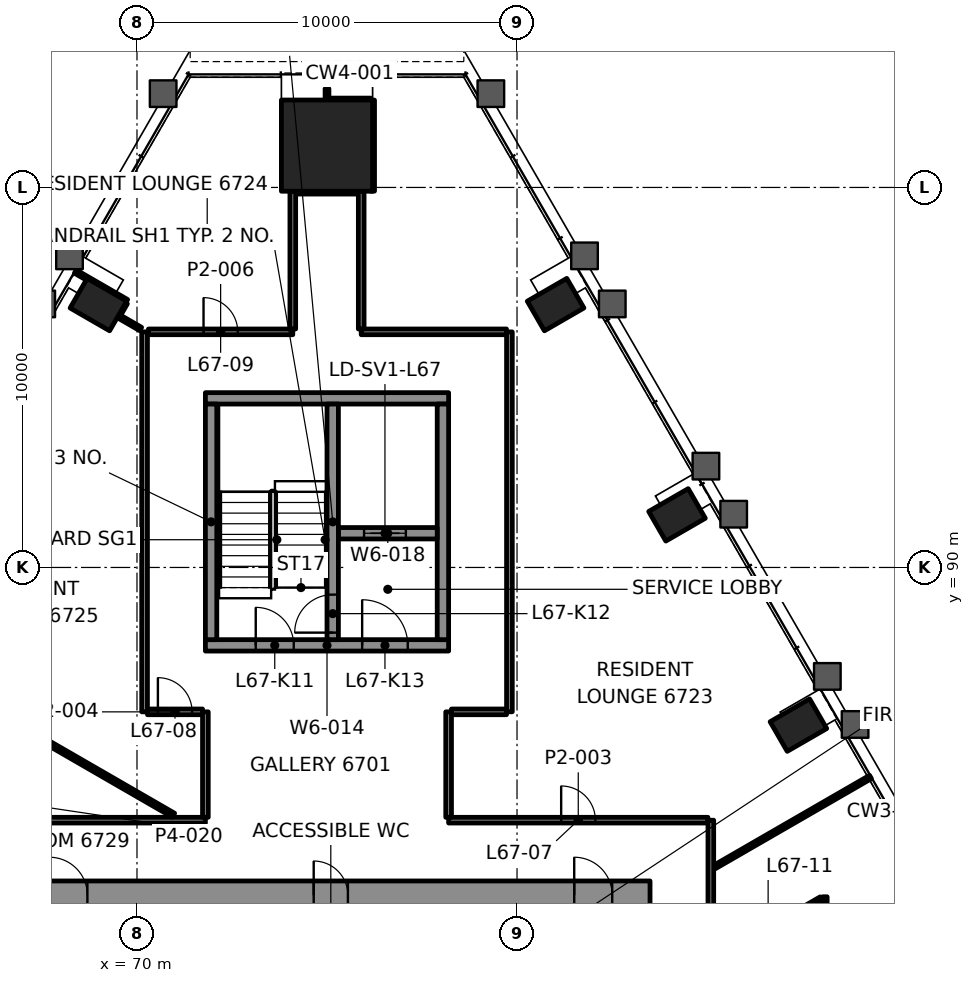
"""IFC4 building model, lengths in metres.
Left out: names, types, materials, properties, quantities, classifications, styles, units other than length and angle.
Written with IfcOpenShell. Run it as: python <this file> out.ifc"""

import sys

from ifc_helpers import new_model, si_unit, direction, frame, frame_2d, origin, origin_2d, place, context, subcontext, project, spatial, rectangle, hollow_rectangle, extrude, element, fill, save


model = new_model("IFC4")
c1 = context("Model", 3, precision=1e-05, world=origin(), true_north=direction((0.0, 1.0)))
c2 = subcontext(c1, "Body", "Model", "MODEL_VIEW")
j1 = project(units=[si_unit("LENGTHUNIT", "METRE"), si_unit("PLANEANGLEUNIT", "RADIAN")], contexts=[c1])
p1 = place(None, origin())
s1 = spatial("IfcSite", under=j1, at=p1, CompositionType="ELEMENT")
p2 = place(p1, origin())
s2 = spatial("IfcBuilding", under=s1, at=p2, CompositionType="ELEMENT")
p3 = place(p2, frame((0.0, 0.0, 281.1)))
s3 = spatial("IfcBuildingStorey", under=s2, at=p3, CompositionType="ELEMENT", Elevation=281.1)
p4 = place(p3, frame((75.0, 101.101, 0.0), z_axis=(0.0, 0.0, 1.0), x_axis=(-1.0, 0.0, 0.0)))
e1 = element("IfcColumn", 1, at=p4, inside=s3, PredefinedType="COLUMN", context=c2, shape_type="SweptSolid", body=[
    extrude(rectangle(XDim=2.4, YDim=2.4, at=origin_2d()), origin(), (0.0, 0.0, 1.0), 3.5),
])
for number, where, z_axis, x_axis in (
    (2, (87.405, 85.851, -0.0), (0.0, 0.0, 1.0), (-0.5, 0.866, 0.0)),
    (3, (84.21, 91.384, -0.0), (0.0, 0.0, 1.0), (-0.5, 0.866, 0.0)),
    (4, (81.015, 96.917, -0.0), (0.0, 0.0, 1.0), (-0.5, 0.866, 0.0)),
    (5, (68.985, 96.917, -0.0), (0.0, 0.0, 1.0), (-0.5, -0.866, 0.0)),
):
    element("IfcColumn", number, at=place(p3, frame(where, z_axis=z_axis, x_axis=x_axis)), inside=s3, PredefinedType="COLUMN", context=c2, shape_type="SweptSolid", body=[
        extrude(hollow_rectangle(XDim=0.9, YDim=1.2, WallThickness=0.06, at=origin_2d()), origin(), (0.0, 0.0, 1.0), 3.5),
    ])
p5 = place(p3, frame((66.5, 81.375, 0.0), z_axis=(0.0, 0.0, 1.0), x_axis=(1.0, 0.0, 0.0)))
e6 = element("IfcWall", 6, at=p5, inside=s3, PredefinedType="SHEAR", context=c2, shape_type="SweptSolid", body=[
    extrude(rectangle(XDim=17.0, YDim=0.75, at=frame_2d((8.5, 0.0))), origin(), (0.0, 0.0, 1.0), 3.3),
])
p6 = place(p5, frame((1.195, 0.0, 0.0)))
e7 = element("IfcOpeningElement", 7, at=p6, cuts=e6, PredefinedType="OPENING", context=c2, shape_type="SweptSolid", body=[
    extrude(rectangle(XDim=1.0, YDim=2.1, at=frame_2d((0.5, 1.05))), frame((0.0, 0.385, 0.0), z_axis=(0.0, -1.0, 0.0), x_axis=(1.0, 0.0, 0.0)), (0.0, 0.0, 1.0), 0.77),
])
p7 = place(p5, frame((15.005, 0.0, 0.0)))
e8 = element("IfcOpeningElement", 8, at=p7, cuts=e6, PredefinedType="OPENING", context=c2, shape_type="SweptSolid", body=[
    extrude(rectangle(XDim=1.0, YDim=2.1, at=frame_2d((0.5, 1.05))), frame((0.0, 0.385, 0.0), z_axis=(0.0, -1.0, 0.0), x_axis=(1.0, 0.0, 0.0)), (0.0, 0.0, 1.0), 0.77),
])
p8 = place(p5, frame((8.15, 0.0, 0.0)))
e9 = element("IfcOpeningElement", 9, at=p8, cuts=e6, PredefinedType="OPENING", context=c2, shape_type="SweptSolid", body=[
    extrude(rectangle(XDim=0.9, YDim=2.1, at=frame_2d((0.45, 1.05))), frame((0.0, 0.385, 0.0), z_axis=(0.0, -1.0, 0.0), x_axis=(1.0, 0.0, 0.0)), (0.0, 0.0, 1.0), 0.77),
])
p9 = place(p3, frame((71.8, 87.95, 0.0), z_axis=(0.0, 0.0, 1.0), x_axis=(1.0, 0.0, 0.0)))
e10 = element("IfcWall", 10, at=p9, inside=s3, PredefinedType="SHEAR", context=c2, shape_type="SweptSolid", body=[
    extrude(rectangle(XDim=6.4, YDim=0.3, at=frame_2d((3.2, 0.0))), origin(), (0.0, 0.0, 1.0), 3.3),
])
p10 = place(p9, frame((1.325, 0.0, 0.0)))
e11 = element("IfcOpeningElement", 11, at=p10, cuts=e10, PredefinedType="OPENING", context=c2, shape_type="SweptSolid", body=[
    extrude(rectangle(XDim=1.0, YDim=2.1, at=frame_2d((0.5, 1.05))), frame((0.0, 0.16, 0.0), z_axis=(0.0, -1.0, 0.0), x_axis=(1.0, 0.0, 0.0)), (0.0, 0.0, 1.0), 0.32),
])
p11 = place(p9, frame((4.125, 0.0, 0.0)))
e12 = element("IfcOpeningElement", 12, at=p11, cuts=e10, PredefinedType="OPENING", context=c2, shape_type="SweptSolid", body=[
    extrude(rectangle(XDim=1.2, YDim=2.1, at=frame_2d((0.6, 1.05))), frame((0.0, 0.16, 0.0), z_axis=(0.0, -1.0, 0.0), x_axis=(1.0, 0.0, 0.0)), (0.0, 0.0, 1.0), 0.32),
])
p12 = place(p3, frame((71.8, 94.45, 0.0), z_axis=(0.0, 0.0, 1.0), x_axis=(1.0, 0.0, 0.0)))
e13 = element("IfcWall", 13, at=p12, inside=s3, PredefinedType="SHEAR", context=c2, shape_type="SweptSolid", body=[
    extrude(rectangle(XDim=6.4, YDim=0.3, at=frame_2d((3.2, 0.0))), origin(), (0.0, 0.0, 1.0), 3.3),
])
for number, where, z_axis, x_axis in (
    (14, (71.95, 88.1, 0.0), (0.0, 0.0, 1.0), (0.0, 1.0, 0.0)),
    (15, (78.05, 88.1, 0.0), (0.0, 0.0, 1.0), (0.0, 1.0, 0.0)),
):
    element("IfcWall", number, at=place(p3, frame(where, z_axis=z_axis, x_axis=x_axis)), inside=s3, PredefinedType="SHEAR", context=c2, shape_type="SweptSolid", body=[
        extrude(rectangle(XDim=6.2, YDim=0.3, at=frame_2d((3.1, 0.0))), origin(), (0.0, 0.0, 1.0), 3.3),
    ])
p13 = place(p3, frame((75.3, 90.9, 0.0), z_axis=(0.0, 0.0, 1.0), x_axis=(1.0, 0.0, 0.0)))
e16 = element("IfcWall", 16, at=p13, inside=s3, PredefinedType="SHEAR", context=c2, shape_type="SweptSolid", body=[
    extrude(rectangle(XDim=2.6, YDim=0.3, at=frame_2d((1.3, 0.0))), origin(), (0.0, 0.0, 1.0), 3.3),
])
p14 = place(p13, frame((0.675, 0.0, 0.0)))
e17 = element("IfcOpeningElement", 17, at=p14, cuts=e16, PredefinedType="OPENING", context=c2, shape_type="SweptSolid", body=[
    extrude(rectangle(XDim=1.1, YDim=2.1, at=frame_2d((0.55, 1.05))), frame((0.0, 0.16, 0.0), z_axis=(0.0, -1.0, 0.0), x_axis=(1.0, 0.0, 0.0)), (0.0, 0.0, 1.0), 0.32),
])
p15 = place(p3, frame((75.15, 88.1, 0.0), z_axis=(0.0, 0.0, 1.0), x_axis=(0.0, 1.0, 0.0)))
e18 = element("IfcWall", 18, at=p15, inside=s3, PredefinedType="SHEAR", context=c2, shape_type="SweptSolid", body=[
    extrude(rectangle(XDim=6.2, YDim=0.3, at=frame_2d((3.1, 0.0))), origin(), (0.0, 0.0, 1.0), 3.3),
])
p16 = place(p15, frame((0.185, 0.0, 0.0)))
e19 = element("IfcOpeningElement", 19, at=p16, cuts=e18, PredefinedType="OPENING", context=c2, shape_type="SweptSolid", body=[
    extrude(rectangle(XDim=1.0, YDim=2.1, at=frame_2d((0.5, 1.05))), frame((0.0, 0.16, 0.0), z_axis=(0.0, -1.0, 0.0), x_axis=(1.0, 0.0, 0.0)), (0.0, 0.0, 1.0), 0.32),
])
p17 = place(p3, frame((64.975, 83.35, 0.0), z_axis=(0.0, 0.0, 1.0), x_axis=(1.0, 0.0, 0.0)))
e20 = element("IfcWall", 20, at=p17, inside=s3, PredefinedType="PARTITIONING", context=c2, shape_type="SweptSolid", body=[
    extrude(rectangle(XDim=6.825, YDim=0.15, at=frame_2d((3.413, 0.0))), origin(), (0.0, 0.0, 1.0), 2.7),
])
p18 = place(p3, frame((78.2, 83.35, 0.0), z_axis=(0.0, 0.0, 1.0), x_axis=(1.0, 0.0, 0.0)))
e21 = element("IfcWall", 21, at=p18, inside=s3, PredefinedType="PARTITIONING", context=c2, shape_type="SweptSolid", body=[
    extrude(rectangle(XDim=6.823, YDim=0.15, at=frame_2d((3.412, 0.0))), origin(), (0.0, 0.0, 1.0), 2.7),
])
p19 = place(p18, frame((2.961, 0.0, 0.0)))
e22 = element("IfcOpeningElement", 22, at=p19, cuts=e21, PredefinedType="OPENING", context=c2, shape_type="SweptSolid", body=[
    extrude(rectangle(XDim=0.9, YDim=2.1, at=frame_2d((0.45, 1.05))), frame((0.0, 0.085, 0.0), z_axis=(0.0, -1.0, 0.0), x_axis=(1.0, 0.0, 0.0)), (0.0, 0.0, 1.0), 0.17),
])
p20 = place(p3, frame((70.276, 86.2, 0.0), z_axis=(0.0, 0.0, 1.0), x_axis=(1.0, 0.0, 0.0)))
e23 = element("IfcWall", 23, at=p20, inside=s3, PredefinedType="PARTITIONING", context=c2, shape_type="SweptSolid", body=[
    extrude(rectangle(XDim=1.449, YDim=0.15, at=frame_2d((0.725, 0.0))), origin(), (0.0, 0.0, 1.0), 2.7),
])
p21 = place(p20, frame((0.275, 0.0, 0.0)))
e24 = element("IfcOpeningElement", 24, at=p21, cuts=e23, PredefinedType="OPENING", context=c2, shape_type="SweptSolid", body=[
    extrude(rectangle(XDim=0.9, YDim=2.1, at=frame_2d((0.45, 1.05))), frame((0.0, 0.085, 0.0), z_axis=(0.0, -1.0, 0.0), x_axis=(1.0, 0.0, 0.0)), (0.0, 0.0, 1.0), 0.17),
])
p22 = place(p3, frame((78.275, 86.2, 0.0), z_axis=(0.0, 0.0, 1.0), x_axis=(1.0, 0.0, 0.0)))
e25 = element("IfcWall", 25, at=p22, inside=s3, PredefinedType="PARTITIONING", context=c2, shape_type="SweptSolid", body=[
    extrude(rectangle(XDim=1.448, YDim=0.15, at=frame_2d((0.724, 0.0))), origin(), (0.0, 0.0, 1.0), 2.7),
])
p23 = place(p3, frame((70.302, 96.2, 0.0), z_axis=(0.0, 0.0, 1.0), x_axis=(1.0, 0.0, 0.0)))
e26 = element("IfcWall", 26, at=p23, inside=s3, PredefinedType="PARTITIONING", context=c2, shape_type="SweptSolid", body=[
    extrude(rectangle(XDim=3.798, YDim=0.15, at=frame_2d((1.899, 0.0))), origin(), (0.0, 0.0, 1.0), 2.7),
])
p24 = place(p23, frame((1.449, 0.0, 0.0)))
e27 = element("IfcOpeningElement", 27, at=p24, cuts=e26, PredefinedType="OPENING", context=c2, shape_type="SweptSolid", body=[
    extrude(rectangle(XDim=0.9, YDim=2.1, at=frame_2d((0.45, 1.05))), frame((0.0, 0.085, 0.0), z_axis=(0.0, -1.0, 0.0), x_axis=(1.0, 0.0, 0.0)), (0.0, 0.0, 1.0), 0.17),
])
p25 = place(p3, frame((75.9, 96.2, 0.0), z_axis=(0.0, 0.0, 1.0), x_axis=(1.0, 0.0, 0.0)))
e28 = element("IfcWall", 28, at=p25, inside=s3, PredefinedType="PARTITIONING", context=c2, shape_type="SweptSolid", body=[
    extrude(rectangle(XDim=3.823, YDim=0.15, at=frame_2d((1.911, 0.0))), origin(), (0.0, 0.0, 1.0), 2.7),
])
p26 = place(p3, frame((74.176, 99.901, 0.0), z_axis=(0.0, 0.0, 1.0), x_axis=(1.0, 0.0, 0.0)))
e29 = element("IfcWall", 29, at=p26, inside=s3, PredefinedType="PARTITIONING", context=c2, shape_type="SweptSolid", body=[
    extrude(rectangle(XDim=1.642, YDim=0.15, at=frame_2d((0.821, 0.0))), origin(), (0.0, 0.0, 1.0), 2.697),
])
p27 = place(p3, frame((75.0, 102.301, 0.0), z_axis=(0.0, 0.0, 1.0), x_axis=(1.0, 0.0, 0.0)))
e30 = element("IfcWall", 30, at=p27, inside=s3, PredefinedType="PARTITIONING", context=c2, shape_type="SweptSolid", body=[
    extrude(rectangle(XDim=1.147, YDim=0.1, at=frame_2d((0.574, 0.0))), origin(), (0.0, 0.0, 1.0), 2.7),
])
p28 = place(p3, frame((88.005, 81.279, 0.0), z_axis=(0.0, 0.0, 1.0), x_axis=(-0.866000447062, -0.500043223821, 0.0)))
e31 = element("IfcWall", 31, at=p28, inside=s3, PredefinedType="PARTITIONING", context=c2, shape_type="SweptSolid", body=[
    extrude(rectangle(XDim=3.228, YDim=0.12, at=frame_2d((1.614, 0.0))), origin(), (0.0, 0.0, 1.0), 2.7),
])
p29 = place(p28, frame((1.214, 0.0, 0.0)))
e32 = element("IfcOpeningElement", 32, at=p29, cuts=e31, PredefinedType="OPENING", context=c2, shape_type="SweptSolid", body=[
    extrude(rectangle(XDim=0.8, YDim=2.1, at=frame_2d((0.4, 1.05))), frame((0.0, 0.07, 0.0), z_axis=(0.0, -1.0, 0.0), x_axis=(1.0, 0.0, 0.0)), (0.0, 0.0, 1.0), 0.14),
])
p30 = place(p3, frame((85.201, 82.119, 0.0), z_axis=(0.0, 0.0, 1.0), x_axis=(0.866035297817, 0.499982862641, 0.0)))
e33 = element("IfcWall", 33, at=p30, inside=s3, PredefinedType="PARTITIONING", context=c2, shape_type="SweptSolid", body=[
    extrude(rectangle(XDim=4.734, YDim=0.1, at=frame_2d((2.367, 0.0))), origin(), (0.0, 0.0, 1.0), 2.688),
])
p31 = place(p3, frame((69.53, 96.661, 0.0), z_axis=(0.0, 0.0, 1.0), x_axis=(0.499904278411, 0.866080661617, 0.0)))
e34 = element("IfcWall", 34, at=p31, inside=s3, PredefinedType="PARTITIONING", context=c2, shape_type="SweptSolid", body=[
    extrude(rectangle(XDim=0.349, YDim=0.1, at=frame_2d((0.174, 0.0))), origin(), (0.0, 0.0, 1.0), 2.7),
])
p32 = place(p3, frame((88.1, 81.334, 0.0), z_axis=(0.0, 0.0, 1.0), x_axis=(0.0, -1.0, 0.0)))
e35 = element("IfcWall", 35, at=p32, inside=s3, PredefinedType="PARTITIONING", context=c2, shape_type="SweptSolid", body=[
    extrude(rectangle(XDim=7.378, YDim=0.12, at=frame_2d((3.689, 0.0))), origin(), (0.0, 0.0, 1.0), 2.7),
])
p33 = place(p32, frame((4.982, 0.0, 0.0)))
e36 = element("IfcOpeningElement", 36, at=p33, cuts=e35, PredefinedType="OPENING", context=c2, shape_type="SweptSolid", body=[
    extrude(rectangle(XDim=0.9, YDim=2.1, at=frame_2d((0.45, 1.05))), frame((0.0, 0.07, 0.0), z_axis=(0.0, -1.0, 0.0), x_axis=(1.0, 0.0, 0.0)), (0.0, 0.0, 1.0), 0.14),
])
p34 = place(p3, frame((85.1, 83.348, 0.0), z_axis=(0.0, 0.0, 1.0), x_axis=(0.0, -1.0, 0.0)))
e37 = element("IfcWall", 37, at=p34, inside=s3, PredefinedType="PARTITIONING", context=c2, shape_type="SweptSolid", body=[
    extrude(rectangle(XDim=13.053, YDim=0.15, at=frame_2d((6.527, 0.0))), origin(), (0.0, 0.0, 1.0), 2.7),
])
p35 = place(p34, frame((8.78, 0.0, 0.0)))
e38 = element("IfcOpeningElement", 38, at=p35, cuts=e37, PredefinedType="OPENING", context=c2, shape_type="SweptSolid", body=[
    extrude(rectangle(XDim=1.0, YDim=2.1, at=frame_2d((0.5, 1.05))), frame((0.0, 0.085, 0.0), z_axis=(0.0, -1.0, 0.0), x_axis=(1.0, 0.0, 0.0)), (0.0, 0.0, 1.0), 0.17),
])
p36 = place(p34, frame((11.537, 0.0, 0.0)))
e39 = element("IfcOpeningElement", 39, at=p36, cuts=e37, PredefinedType="OPENING", context=c2, shape_type="SweptSolid", body=[
    extrude(rectangle(XDim=0.9, YDim=2.1, at=frame_2d((0.45, 1.05))), frame((0.0, 0.085, 0.0), z_axis=(0.0, -1.0, 0.0), x_axis=(1.0, 0.0, 0.0)), (0.0, 0.0, 1.0), 0.17),
])
p37 = place(p3, frame((79.8, 86.202, 0.0), z_axis=(0.0, 0.0, 1.0), x_axis=(0.0, 1.0, 0.0)))
e40 = element("IfcWall", 40, at=p37, inside=s3, PredefinedType="PARTITIONING", context=c2, shape_type="SweptSolid", body=[
    extrude(rectangle(XDim=9.996, YDim=0.15, at=frame_2d((4.998, 0.0))), origin(), (0.0, 0.0, 1.0), 2.7),
])
p38 = place(p3, frame((78.2, 83.425, 0.0), z_axis=(0.0, 0.0, 1.0), x_axis=(0.0, 1.0, 0.0)))
e41 = element("IfcWall", 41, at=p38, inside=s3, PredefinedType="PARTITIONING", context=c2, shape_type="SweptSolid", body=[
    extrude(rectangle(XDim=2.775, YDim=0.15, at=frame_2d((1.387, 0.0))), origin(), (0.0, 0.0, 1.0), 2.697),
])
p39 = place(p3, frame((76.2, 99.903, 0.0), z_axis=(0.0, 0.0, 1.0), x_axis=(0.0, 1.0, 0.0)))
e42 = element("IfcWall", 42, at=p39, inside=s3, PredefinedType="PARTITIONING", context=c2, shape_type="SweptSolid", body=[
    extrude(rectangle(XDim=2.396, YDim=0.1, at=frame_2d((1.198, 0.0))), origin(), (0.0, 0.0, 1.0), 2.7),
])
p40 = place(p3, frame((75.9, 96.275, 0.0), z_axis=(0.0, 0.0, 1.0), x_axis=(0.0, 1.0, 0.0)))
e43 = element("IfcWall", 43, at=p40, inside=s3, PredefinedType="PARTITIONING", context=c2, shape_type="SweptSolid", body=[
    extrude(rectangle(XDim=3.625, YDim=0.15, at=frame_2d((1.813, 0.0))), origin(), (0.0, 0.0, 1.0), 2.7),
])
p41 = place(p3, frame((75.0, 102.351, 0.0), z_axis=(0.0, 0.0, 1.0), x_axis=(0.0, 1.0, 0.0)))
e44 = element("IfcWall", 44, at=p41, inside=s3, PredefinedType="PARTITIONING", context=c2, shape_type="SweptSolid", body=[
    extrude(rectangle(XDim=0.25, YDim=0.1, at=frame_2d((0.125, 0.0))), origin(), (0.0, 0.0, 1.0), 2.7),
])
p42 = place(p3, frame((74.1, 96.275, 0.0), z_axis=(0.0, 0.0, 1.0), x_axis=(0.0, 1.0, 0.0)))
e45 = element("IfcWall", 45, at=p42, inside=s3, PredefinedType="PARTITIONING", context=c2, shape_type="SweptSolid", body=[
    extrude(rectangle(XDim=3.625, YDim=0.15, at=frame_2d((1.812, 0.0))), origin(), (0.0, 0.0, 1.0), 2.7),
])
p43 = place(p3, frame((71.8, 83.425, 0.0), z_axis=(0.0, 0.0, 1.0), x_axis=(0.0, 1.0, 0.0)))
e46 = element("IfcWall", 46, at=p43, inside=s3, PredefinedType="PARTITIONING", context=c2, shape_type="SweptSolid", body=[
    extrude(rectangle(XDim=2.775, YDim=0.15, at=frame_2d((1.387, 0.0))), origin(), (0.0, 0.0, 1.0), 2.697),
])
p44 = place(p3, frame((70.2, 86.2, 0.0), z_axis=(0.0, 0.0, 1.0), x_axis=(0.0, 1.0, 0.0)))
e47 = element("IfcWall", 47, at=p44, inside=s3, PredefinedType="PARTITIONING", context=c2, shape_type="SweptSolid", body=[
    extrude(rectangle(XDim=9.999, YDim=0.15, at=frame_2d((5.0, 0.0))), origin(), (0.0, 0.0, 1.0), 2.7),
])
p45 = place(p3, frame((69.729, 97.007, 0.0), z_axis=(0.0, 0.0, 1.0), x_axis=(-0.866018739521, 0.500011542666, 0.0)))
e48 = element("IfcWall", 48, at=p45, inside=s3, PredefinedType="PARTITIONING", context=c2, shape_type="SweptSolid", body=[
    extrude(rectangle(XDim=1.56, YDim=0.1, at=frame_2d((0.78, 0.0))), origin(), (0.0, 0.0, 1.0), 2.7),
])
p46 = place(p3, frame((70.097, 96.275, 0.0), z_axis=(0.0, 0.0, 1.0), x_axis=(-0.866060802215, 0.499938683108, 0.0)))
e49 = element("IfcWall", 49, at=p46, inside=s3, PredefinedType="PARTITIONING", context=c2, shape_type="SweptSolid", body=[
    extrude(rectangle(XDim=0.684, YDim=0.1, at=frame_2d((0.342, 0.0))), origin(), (0.0, 0.0, 1.0), 2.7),
])
p47 = place(p3, frame((70.961, 83.48, 0.0), z_axis=(0.0, 0.0, 1.0), x_axis=(-0.86603330177, 0.499986320039, 0.0)))
e50 = element("IfcWall", 50, at=p47, inside=s3, PredefinedType="PARTITIONING", context=c2, shape_type="SweptSolid", body=[
    extrude(rectangle(XDim=5.74, YDim=0.12, at=frame_2d((2.87, 0.0))), origin(), (0.0, 0.0, 1.0), 2.7),
])
p48 = place(p3, frame((78.6, 103.462, 0.0), z_axis=(0.0, 0.0, 1.0), x_axis=(-1.0, 0.0, 0.0)))
e51 = element("IfcWall", 51, at=p48, inside=s3, PredefinedType="PARAPET", context=c2, shape_type="SweptSolid", body=[
    extrude(rectangle(XDim=7.2, YDim=0.3, at=frame_2d((3.6, 0.0))), origin(), (0.0, 0.0, 1.0), 1.1),
])
p49 = place(p19, origin())
e52 = element("IfcDoor", 52, at=p49, inside=s3, OperationType="SINGLE_SWING_RIGHT", PredefinedType="DOOR", context=c2, shape_type="SweptSolid", body=[
    extrude(rectangle(XDim=0.9, YDim=2.1, at=frame_2d((0.45, 1.05))), frame((0.0, 0.025, 0.0), z_axis=(0.0, -1.0, 0.0), x_axis=(1.0, 0.0, 0.0)), (0.0, 0.0, 1.0), 0.05),
])
fill(e22, e52)
p50 = place(p21, origin())
e53 = element("IfcDoor", 53, at=p50, inside=s3, OperationType="SINGLE_SWING_RIGHT", PredefinedType="DOOR", context=c2, shape_type="SweptSolid", body=[
    extrude(rectangle(XDim=0.9, YDim=2.1, at=frame_2d((0.45, 1.05))), frame((0.0, 0.025, 0.0), z_axis=(0.0, -1.0, 0.0), x_axis=(1.0, 0.0, 0.0)), (0.0, 0.0, 1.0), 0.05),
])
fill(e24, e53)
p51 = place(p24, origin())
e54 = element("IfcDoor", 54, at=p51, inside=s3, OperationType="SINGLE_SWING_LEFT", PredefinedType="DOOR", context=c2, shape_type="SweptSolid", body=[
    extrude(rectangle(XDim=0.9, YDim=2.1, at=frame_2d((0.45, 1.05))), frame((0.0, 0.025, 0.0), z_axis=(0.0, -1.0, 0.0), x_axis=(1.0, 0.0, 0.0)), (0.0, 0.0, 1.0), 0.05),
])
fill(e27, e54)
p52 = place(p14, origin())
e55 = element("IfcDoor", 55, at=p52, inside=s3, OperationType="DOUBLE_DOOR_SLIDING", PredefinedType="DOOR", context=c2, shape_type="SweptSolid", body=[
    extrude(rectangle(XDim=1.1, YDim=2.1, at=frame_2d((0.55, 1.05))), frame((0.0, 0.025, 0.0), z_axis=(0.0, -1.0, 0.0), x_axis=(1.0, 0.0, 0.0)), (0.0, 0.0, 1.0), 0.05),
])
fill(e17, e55)
p53 = place(p6, origin())
e56 = element("IfcDoor", 56, at=p53, inside=s3, OperationType="SINGLE_SWING_RIGHT", PredefinedType="DOOR", context=c2, shape_type="SweptSolid", body=[
    extrude(rectangle(XDim=1.0, YDim=2.1, at=frame_2d((0.5, 1.05))), frame((0.0, 0.095, 0.0), z_axis=(0.0, -1.0, 0.0), x_axis=(1.0, 0.0, 0.0)), (0.0, 0.0, 1.0), 0.19),
])
fill(e7, e56)
p54 = place(p7, origin())
e57 = element("IfcDoor", 57, at=p54, inside=s3, OperationType="SINGLE_SWING_LEFT", PredefinedType="DOOR", context=c2, shape_type="SweptSolid", body=[
    extrude(rectangle(XDim=1.0, YDim=2.1, at=frame_2d((0.5, 1.05))), frame((0.0, 0.095, 0.0), z_axis=(0.0, -1.0, 0.0), x_axis=(1.0, 0.0, 0.0)), (0.0, 0.0, 1.0), 0.19),
])
fill(e8, e57)
p55 = place(p10, origin())
e58 = element("IfcDoor", 58, at=p55, inside=s3, OperationType="SINGLE_SWING_RIGHT", PredefinedType="DOOR", context=c2, shape_type="SweptSolid", body=[
    extrude(rectangle(XDim=1.0, YDim=2.1, at=frame_2d((0.5, 1.05))), frame((0.0, 0.025, 0.0), z_axis=(0.0, -1.0, 0.0), x_axis=(1.0, 0.0, 0.0)), (0.0, 0.0, 1.0), 0.05),
])
fill(e11, e58)
p56 = place(p16, origin())
e59 = element("IfcDoor", 59, at=p56, inside=s3, OperationType="SINGLE_SWING_LEFT", PredefinedType="DOOR", context=c2, shape_type="SweptSolid", body=[
    extrude(rectangle(XDim=1.0, YDim=2.1, at=frame_2d((0.5, 1.05))), frame((0.0, 0.025, 0.0), z_axis=(0.0, -1.0, 0.0), x_axis=(1.0, 0.0, 0.0)), (0.0, 0.0, 1.0), 0.05),
])
fill(e19, e59)
p57 = place(p11, origin())
e60 = element("IfcDoor", 60, at=p57, inside=s3, OperationType="SINGLE_SWING_RIGHT", PredefinedType="DOOR", context=c2, shape_type="SweptSolid", body=[
    extrude(rectangle(XDim=1.2, YDim=2.1, at=frame_2d((0.6, 1.05))), frame((0.0, 0.025, 0.0), z_axis=(0.0, -1.0, 0.0), x_axis=(1.0, 0.0, 0.0)), (0.0, 0.0, 1.0), 0.05),
])
fill(e12, e60)
p58 = place(p8, origin())
e61 = element("IfcDoor", 61, at=p58, inside=s3, OperationType="SINGLE_SWING_RIGHT", PredefinedType="DOOR", context=c2, shape_type="SweptSolid", body=[
    extrude(rectangle(XDim=0.9, YDim=2.1, at=frame_2d((0.45, 1.05))), frame((0.0, 0.095, 0.0), z_axis=(0.0, -1.0, 0.0), x_axis=(1.0, 0.0, 0.0)), (0.0, 0.0, 1.0), 0.19),
])
fill(e9, e61)
save(model, sys.argv[1])
